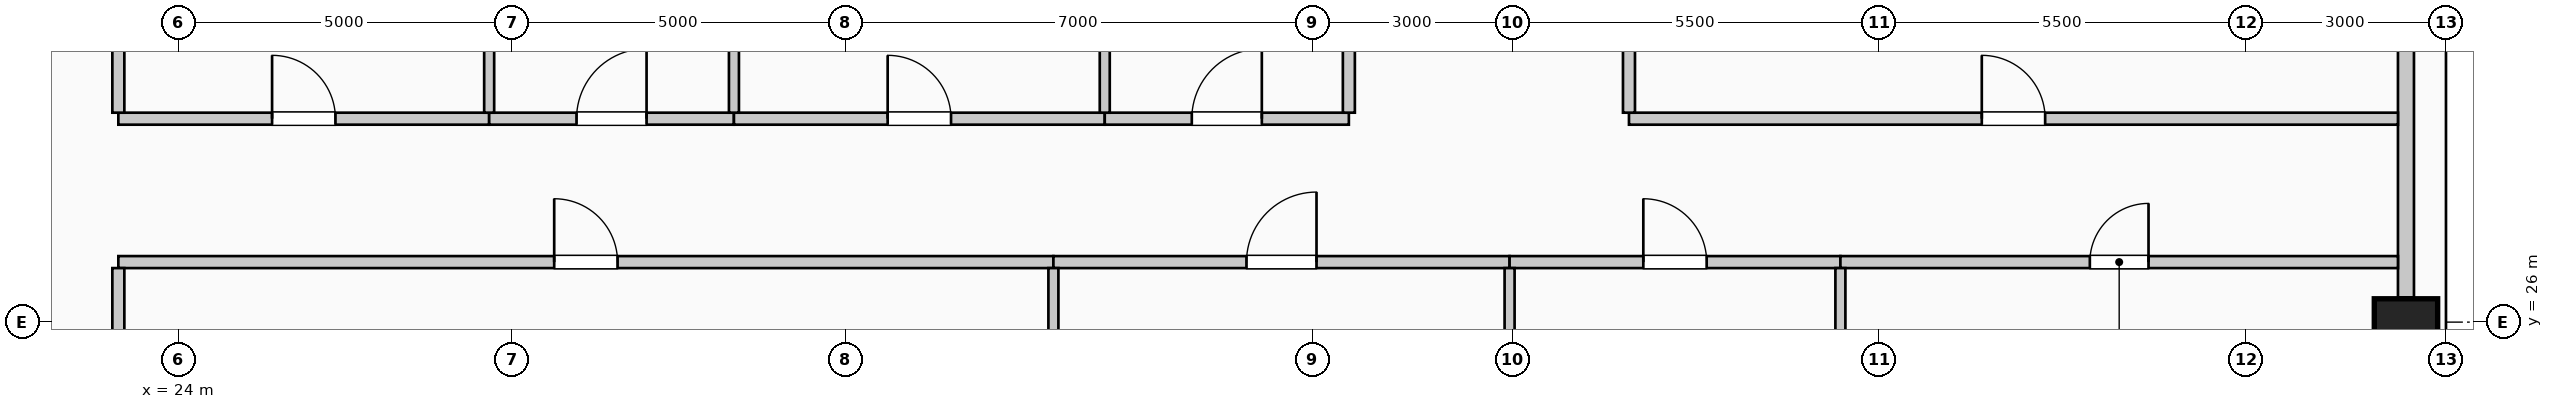
"""IFC4 building model, lengths in metres.
Left out: names, types, materials, properties, quantities, classifications, styles, units other than length and angle.
Written with IfcOpenShell. Run it as: python <this file> out.ifc"""

import sys

from ifc_helpers import new_model, si_unit, direction, frame, frame_2d, origin, origin_2d, place, context, subcontext, project, spatial, rectangle, extrude, element, fill, save


model = new_model("IFC4")
c1 = context("Model", 3, precision=1e-05, world=origin(), true_north=direction((0.0, 1.0)))
c2 = subcontext(c1, "Body", "Model", "MODEL_VIEW")
j1 = project(units=[si_unit("LENGTHUNIT", "METRE"), si_unit("PLANEANGLEUNIT", "RADIAN")], contexts=[c1])
p1 = place(None, origin())
s1 = spatial("IfcSite", under=j1, at=p1, CompositionType="ELEMENT")
p2 = place(p1, origin())
s2 = spatial("IfcBuilding", under=s1, at=p2, CompositionType="ELEMENT")
p3 = place(p2, frame((0.0, 0.0, 276.6)))
s3 = spatial("IfcBuildingStorey", under=s2, at=p3, CompositionType="ELEMENT", Elevation=276.6)
p4 = place(p3, frame((57.4, 26.0, 0.0), z_axis=(0.0, 0.0, 1.0), x_axis=(0.0, 1.0, 0.0)))
e1 = element("IfcColumn", 1, at=p4, inside=s3, PredefinedType="COLUMN", context=c2, shape_type="SweptSolid", body=[
    extrude(rectangle(XDim=0.7, YDim=0.95, at=origin_2d()), origin(), (0.0, 0.0, 1.0), 4.0),
])
p5 = place(p3, frame((57.4, 33.63, 0.0), z_axis=(0.0, 0.0, 1.0), x_axis=(0.0, -1.0, 0.0)))
e2 = element("IfcWall", 2, at=p5, inside=s3, PredefinedType="SOLIDWALL", context=c2, shape_type="SweptSolid", body=[
    extrude(rectangle(XDim=7.26, YDim=0.24, at=frame_2d((3.63, 0.0))), origin(), (0.0, 0.0, 1.0), 2.91),
])
p6 = place(p3, frame((23.1, 26.9, 0.0), z_axis=(0.0, 0.0, 1.0), x_axis=(1.0, 0.0, 0.0)))
e3 = element("IfcWall", 3, at=p6, inside=s3, PredefinedType="PARTITIONING", context=c2, shape_type="SweptSolid", body=[
    extrude(rectangle(XDim=14.02, YDim=0.18, at=frame_2d((7.01, 0.0))), origin(), (0.0, 0.0, 1.0), 3.66),
])
p7 = place(p6, frame((6.535, 0.0, 0.0)))
e4 = element("IfcOpeningElement", 4, at=p7, cuts=e3, PredefinedType="OPENING", context=c2, shape_type="SweptSolid", body=[
    extrude(rectangle(XDim=0.95, YDim=2.15, at=frame_2d((0.475, 1.075))), frame((0.0, 0.1, 0.0), z_axis=(0.0, -1.0, 0.0), x_axis=(1.0, 0.0, 0.0)), (0.0, 0.0, 1.0), 0.2),
])
p8 = place(p3, frame((37.12, 26.9, 0.0), z_axis=(0.0, 0.0, 1.0), x_axis=(1.0, 0.0, 0.0)))
e5 = element("IfcWall", 5, at=p8, inside=s3, PredefinedType="PARTITIONING", context=c2, shape_type="SweptSolid", body=[
    extrude(rectangle(XDim=6.84, YDim=0.18, at=frame_2d((3.42, 0.0))), origin(), (0.0, 0.0, 1.0), 3.66),
])
p9 = place(p8, frame((2.895, 0.0, 0.0)))
e6 = element("IfcOpeningElement", 6, at=p9, cuts=e5, PredefinedType="OPENING", context=c2, shape_type="SweptSolid", body=[
    extrude(rectangle(XDim=1.05, YDim=2.15, at=frame_2d((0.525, 1.075))), frame((0.0, 0.1, 0.0), z_axis=(0.0, -1.0, 0.0), x_axis=(1.0, 0.0, 0.0)), (0.0, 0.0, 1.0), 0.2),
])
p10 = place(p3, frame((43.96, 26.9, 0.0), z_axis=(0.0, 0.0, 1.0), x_axis=(1.0, 0.0, 0.0)))
e7 = element("IfcWall", 7, at=p10, inside=s3, PredefinedType="PARTITIONING", context=c2, shape_type="SweptSolid", body=[
    extrude(rectangle(XDim=4.96, YDim=0.18, at=frame_2d((2.48, 0.0))), origin(), (0.0, 0.0, 1.0), 3.66),
])
p11 = place(p10, frame((2.005, 0.0, 0.0)))
e8 = element("IfcOpeningElement", 8, at=p11, cuts=e7, PredefinedType="OPENING", context=c2, shape_type="SweptSolid", body=[
    extrude(rectangle(XDim=0.95, YDim=2.15, at=frame_2d((0.475, 1.075))), frame((0.0, 0.1, 0.0), z_axis=(0.0, -1.0, 0.0), x_axis=(1.0, 0.0, 0.0)), (0.0, 0.0, 1.0), 0.2),
])
p12 = place(p3, frame((48.92, 26.9, 0.0), z_axis=(0.0, 0.0, 1.0), x_axis=(1.0, 0.0, 0.0)))
e9 = element("IfcWall", 9, at=p12, inside=s3, PredefinedType="PARTITIONING", context=c2, shape_type="SweptSolid", body=[
    extrude(rectangle(XDim=8.36, YDim=0.18, at=frame_2d((4.18, 0.0))), origin(), (0.0, 0.0, 1.0), 3.66),
])
p13 = place(p12, frame((3.74, 0.0, 0.0)))
e10 = element("IfcOpeningElement", 10, at=p13, cuts=e9, PredefinedType="OPENING", context=c2, shape_type="SweptSolid", body=[
    extrude(rectangle(XDim=0.88, YDim=2.1, at=frame_2d((0.44, 1.05))), frame((0.0, 0.1, 0.0), z_axis=(0.0, -1.0, 0.0), x_axis=(1.0, 0.0, 0.0)), (0.0, 0.0, 1.0), 0.2),
])
p14 = place(p3, frame((23.1, 29.05, 0.0), z_axis=(0.0, 0.0, 1.0), x_axis=(1.0, 0.0, 0.0)))
e11 = element("IfcWall", 11, at=p14, inside=s3, PredefinedType="PARTITIONING", context=c2, shape_type="SweptSolid", body=[
    extrude(rectangle(XDim=5.56, YDim=0.18, at=frame_2d((2.78, 0.0))), origin(), (0.0, 0.0, 1.0), 3.66),
])
p15 = place(p14, frame((2.305, 0.0, 0.0)))
e12 = element("IfcOpeningElement", 12, at=p15, cuts=e11, PredefinedType="OPENING", context=c2, shape_type="SweptSolid", body=[
    extrude(rectangle(XDim=0.95, YDim=2.15, at=frame_2d((0.475, 1.075))), frame((0.0, 0.1, 0.0), z_axis=(0.0, -1.0, 0.0), x_axis=(1.0, 0.0, 0.0)), (0.0, 0.0, 1.0), 0.2),
])
p16 = place(p3, frame((28.66, 29.05, 0.0), z_axis=(0.0, 0.0, 1.0), x_axis=(1.0, 0.0, 0.0)))
e13 = element("IfcWall", 13, at=p16, inside=s3, PredefinedType="PARTITIONING", context=c2, shape_type="SweptSolid", body=[
    extrude(rectangle(XDim=3.67, YDim=0.18, at=frame_2d((1.835, 0.0))), origin(), (0.0, 0.0, 1.0), 3.66),
])
p17 = place(p16, frame((1.31, 0.0, 0.0)))
e14 = element("IfcOpeningElement", 14, at=p17, cuts=e13, PredefinedType="OPENING", context=c2, shape_type="SweptSolid", body=[
    extrude(rectangle(XDim=1.05, YDim=2.15, at=frame_2d((0.525, 1.075))), frame((0.0, 0.1, 0.0), z_axis=(0.0, -1.0, 0.0), x_axis=(1.0, 0.0, 0.0)), (0.0, 0.0, 1.0), 0.2),
])
p18 = place(p3, frame((32.33, 29.05, 0.0), z_axis=(0.0, 0.0, 1.0), x_axis=(1.0, 0.0, 0.0)))
e15 = element("IfcWall", 15, at=p18, inside=s3, PredefinedType="PARTITIONING", context=c2, shape_type="SweptSolid", body=[
    extrude(rectangle(XDim=5.56, YDim=0.18, at=frame_2d((2.78, 0.0))), origin(), (0.0, 0.0, 1.0), 3.66),
])
p19 = place(p18, frame((2.305, 0.0, 0.0)))
e16 = element("IfcOpeningElement", 16, at=p19, cuts=e15, PredefinedType="OPENING", context=c2, shape_type="SweptSolid", body=[
    extrude(rectangle(XDim=0.95, YDim=2.15, at=frame_2d((0.475, 1.075))), frame((0.0, 0.1, 0.0), z_axis=(0.0, -1.0, 0.0), x_axis=(1.0, 0.0, 0.0)), (0.0, 0.0, 1.0), 0.2),
])
p20 = place(p3, frame((37.89, 29.05, 0.0), z_axis=(0.0, 0.0, 1.0), x_axis=(1.0, 0.0, 0.0)))
e17 = element("IfcWall", 17, at=p20, inside=s3, PredefinedType="PARTITIONING", context=c2, shape_type="SweptSolid", body=[
    extrude(rectangle(XDim=3.66, YDim=0.18, at=frame_2d((1.83, 0.0))), origin(), (0.0, 0.0, 1.0), 3.66),
])
p21 = place(p20, frame((1.305, 0.0, 0.0)))
e18 = element("IfcOpeningElement", 18, at=p21, cuts=e17, PredefinedType="OPENING", context=c2, shape_type="SweptSolid", body=[
    extrude(rectangle(XDim=1.05, YDim=2.15, at=frame_2d((0.525, 1.075))), frame((0.0, 0.1, 0.0), z_axis=(0.0, -1.0, 0.0), x_axis=(1.0, 0.0, 0.0)), (0.0, 0.0, 1.0), 0.2),
])
p22 = place(p3, frame((45.75, 29.05, 0.0), z_axis=(0.0, 0.0, 1.0), x_axis=(1.0, 0.0, 0.0)))
e19 = element("IfcWall", 19, at=p22, inside=s3, PredefinedType="PARTITIONING", context=c2, shape_type="SweptSolid", body=[
    extrude(rectangle(XDim=11.53, YDim=0.18, at=frame_2d((5.765, 0.0))), origin(), (0.0, 0.0, 1.0), 3.66),
])
p23 = place(p22, frame((5.29, 0.0, 0.0)))
e20 = element("IfcOpeningElement", 20, at=p23, cuts=e19, PredefinedType="OPENING", context=c2, shape_type="SweptSolid", body=[
    extrude(rectangle(XDim=0.95, YDim=2.15, at=frame_2d((0.475, 1.075))), frame((0.0, 0.1, 0.0), z_axis=(0.0, -1.0, 0.0), x_axis=(1.0, 0.0, 0.0)), (0.0, 0.0, 1.0), 0.2),
])
p24 = place(p3, frame((23.1, 17.3, 0.0), z_axis=(0.0, 0.0, 1.0), x_axis=(0.0, 1.0, 0.0)))
e21 = element("IfcWall", 21, at=p24, inside=s3, PredefinedType="PARTITIONING", context=c2, shape_type="SweptSolid", body=[
    extrude(rectangle(XDim=9.51, YDim=0.18, at=frame_2d((4.755, 0.0))), origin(), (0.0, 0.0, 1.0), 3.66),
])
p25 = place(p3, frame((23.1, 29.14, 0.0), z_axis=(0.0, 0.0, 1.0), x_axis=(0.0, 1.0, 0.0)))
e22 = element("IfcWall", 22, at=p25, inside=s3, PredefinedType="PARTITIONING", context=c2, shape_type="SweptSolid", body=[
    extrude(rectangle(XDim=3.12, YDim=0.18, at=frame_2d((1.56, 0.0))), origin(), (0.0, 0.0, 1.0), 3.66),
])
p26 = place(p3, frame((28.66, 29.14, 0.0), z_axis=(0.0, 0.0, 1.0), x_axis=(0.0, 1.0, 0.0)))
e23 = element("IfcWall", 23, at=p26, inside=s3, PredefinedType="PARTITIONING", context=c2, shape_type="SweptSolid", body=[
    extrude(rectangle(XDim=4.435, YDim=0.15, at=frame_2d((2.218, 0.0))), origin(), (0.0, 0.0, 1.0), 3.66),
])
p27 = place(p3, frame((32.33, 29.14, 0.0), z_axis=(0.0, 0.0, 1.0), x_axis=(0.0, 1.0, 0.0)))
e24 = element("IfcWall", 24, at=p27, inside=s3, PredefinedType="PARTITIONING", context=c2, shape_type="SweptSolid", body=[
    extrude(rectangle(XDim=16.14, YDim=0.15, at=frame_2d((8.07, 0.0))), origin(), (0.0, 0.0, 1.0), 3.66),
])
p28 = place(p3, frame((37.12, 0.72, 0.0), z_axis=(0.0, 0.0, 1.0), x_axis=(0.0, 1.0, 0.0)))
e25 = element("IfcWall", 25, at=p28, inside=s3, PredefinedType="PARTITIONING", context=c2, shape_type="SweptSolid", body=[
    extrude(rectangle(XDim=26.09, YDim=0.15, at=frame_2d((13.045, 0.0))), origin(), (0.0, 0.0, 1.0), 3.66),
])
p29 = place(p3, frame((37.89, 29.14, 0.0), z_axis=(0.0, 0.0, 1.0), x_axis=(0.0, 1.0, 0.0)))
e26 = element("IfcWall", 26, at=p29, inside=s3, PredefinedType="PARTITIONING", context=c2, shape_type="SweptSolid", body=[
    extrude(rectangle(XDim=16.14, YDim=0.15, at=frame_2d((8.07, 0.0))), origin(), (0.0, 0.0, 1.0), 3.66),
])
p30 = place(p3, frame((41.55, 29.14, 0.0), z_axis=(0.0, 0.0, 1.0), x_axis=(0.0, 1.0, 0.0)))
e27 = element("IfcWall", 27, at=p30, inside=s3, PredefinedType="PARTITIONING", context=c2, shape_type="SweptSolid", body=[
    extrude(rectangle(XDim=3.21, YDim=0.18, at=frame_2d((1.605, 0.0))), origin(), (0.0, 0.0, 1.0), 3.105),
])
p31 = place(p3, frame((43.96, 1.075, 0.0), z_axis=(0.0, 0.0, 1.0), x_axis=(0.0, 1.0, 0.0)))
e28 = element("IfcWall", 28, at=p31, inside=s3, PredefinedType="PARTITIONING", context=c2, shape_type="SweptSolid", body=[
    extrude(rectangle(XDim=25.735, YDim=0.15, at=frame_2d((12.868, 0.0))), origin(), (0.0, 0.0, 1.0), 3.66),
])
p32 = place(p3, frame((45.75, 29.14, 0.0), z_axis=(0.0, 0.0, 1.0), x_axis=(0.0, 1.0, 0.0)))
e29 = element("IfcWall", 29, at=p32, inside=s3, PredefinedType="PARTITIONING", context=c2, shape_type="SweptSolid", body=[
    extrude(rectangle(XDim=3.135, YDim=0.18, at=frame_2d((1.567, 0.0))), origin(), (0.0, 0.0, 1.0), 3.66),
])
p33 = place(p3, frame((48.92, 0.72, 0.0), z_axis=(0.0, 0.0, 1.0), x_axis=(0.0, 1.0, 0.0)))
e30 = element("IfcWall", 30, at=p33, inside=s3, PredefinedType="PARTITIONING", context=c2, shape_type="SweptSolid", body=[
    extrude(rectangle(XDim=26.09, YDim=0.15, at=frame_2d((13.045, 0.0))), origin(), (0.0, 0.0, 1.0), 3.66),
])
p34 = place(p7, origin())
e31 = element("IfcDoor", 31, at=p34, inside=s3, OperationType="SINGLE_SWING_LEFT", PredefinedType="DOOR", context=c2, shape_type="SweptSolid", body=[
    extrude(rectangle(XDim=0.95, YDim=2.15, at=frame_2d((0.475, 1.075))), frame((0.0, 0.025, 0.0), z_axis=(0.0, -1.0, 0.0), x_axis=(1.0, 0.0, 0.0)), (0.0, 0.0, 1.0), 0.05),
])
fill(e4, e31)
p35 = place(p9, origin())
e32 = element("IfcDoor", 32, at=p35, inside=s3, OperationType="SINGLE_SWING_RIGHT", PredefinedType="DOOR", context=c2, shape_type="SweptSolid", body=[
    extrude(rectangle(XDim=1.05, YDim=2.15, at=frame_2d((0.525, 1.075))), frame((0.0, 0.025, 0.0), z_axis=(0.0, -1.0, 0.0), x_axis=(1.0, 0.0, 0.0)), (0.0, 0.0, 1.0), 0.05),
])
fill(e6, e32)
p36 = place(p11, origin())
e33 = element("IfcDoor", 33, at=p36, inside=s3, OperationType="SINGLE_SWING_LEFT", PredefinedType="DOOR", context=c2, shape_type="SweptSolid", body=[
    extrude(rectangle(XDim=0.95, YDim=2.15, at=frame_2d((0.475, 1.075))), frame((0.0, 0.025, 0.0), z_axis=(0.0, -1.0, 0.0), x_axis=(1.0, 0.0, 0.0)), (0.0, 0.0, 1.0), 0.05),
])
fill(e8, e33)
p37 = place(p13, origin())
e34 = element("IfcDoor", 34, at=p37, inside=s3, OperationType="SINGLE_SWING_RIGHT", PredefinedType="DOOR", context=c2, shape_type="SweptSolid", body=[
    extrude(rectangle(XDim=0.88, YDim=2.1, at=frame_2d((0.44, 1.05))), frame((0.0, 0.025, 0.0), z_axis=(0.0, -1.0, 0.0), x_axis=(1.0, 0.0, 0.0)), (0.0, 0.0, 1.0), 0.05),
])
fill(e10, e34)
p38 = place(p15, origin())
e35 = element("IfcDoor", 35, at=p38, inside=s3, OperationType="SINGLE_SWING_LEFT", PredefinedType="DOOR", context=c2, shape_type="SweptSolid", body=[
    extrude(rectangle(XDim=0.95, YDim=2.15, at=frame_2d((0.475, 1.075))), frame((0.0, 0.025, 0.0), z_axis=(0.0, -1.0, 0.0), x_axis=(1.0, 0.0, 0.0)), (0.0, 0.0, 1.0), 0.05),
])
fill(e12, e35)
p39 = place(p17, origin())
e36 = element("IfcDoor", 36, at=p39, inside=s3, OperationType="SINGLE_SWING_RIGHT", PredefinedType="DOOR", context=c2, shape_type="SweptSolid", body=[
    extrude(rectangle(XDim=1.05, YDim=2.15, at=frame_2d((0.525, 1.075))), frame((0.0, 0.025, 0.0), z_axis=(0.0, -1.0, 0.0), x_axis=(1.0, 0.0, 0.0)), (0.0, 0.0, 1.0), 0.05),
])
fill(e14, e36)
p40 = place(p19, origin())
e37 = element("IfcDoor", 37, at=p40, inside=s3, OperationType="SINGLE_SWING_LEFT", PredefinedType="DOOR", context=c2, shape_type="SweptSolid", body=[
    extrude(rectangle(XDim=0.95, YDim=2.15, at=frame_2d((0.475, 1.075))), frame((0.0, 0.025, 0.0), z_axis=(0.0, -1.0, 0.0), x_axis=(1.0, 0.0, 0.0)), (0.0, 0.0, 1.0), 0.05),
])
fill(e16, e37)
p41 = place(p21, origin())
e38 = element("IfcDoor", 38, at=p41, inside=s3, OperationType="SINGLE_SWING_RIGHT", PredefinedType="DOOR", context=c2, shape_type="SweptSolid", body=[
    extrude(rectangle(XDim=1.05, YDim=2.15, at=frame_2d((0.525, 1.075))), frame((0.0, 0.025, 0.0), z_axis=(0.0, -1.0, 0.0), x_axis=(1.0, 0.0, 0.0)), (0.0, 0.0, 1.0), 0.05),
])
fill(e18, e38)
p42 = place(p23, origin())
e39 = element("IfcDoor", 39, at=p42, inside=s3, OperationType="SINGLE_SWING_LEFT", PredefinedType="DOOR", context=c2, shape_type="SweptSolid", body=[
    extrude(rectangle(XDim=0.95, YDim=2.15, at=frame_2d((0.475, 1.075))), frame((0.0, 0.025, 0.0), z_axis=(0.0, -1.0, 0.0), x_axis=(1.0, 0.0, 0.0)), (0.0, 0.0, 1.0), 0.05),
])
fill(e20, e39)
save(model, sys.argv[1])
